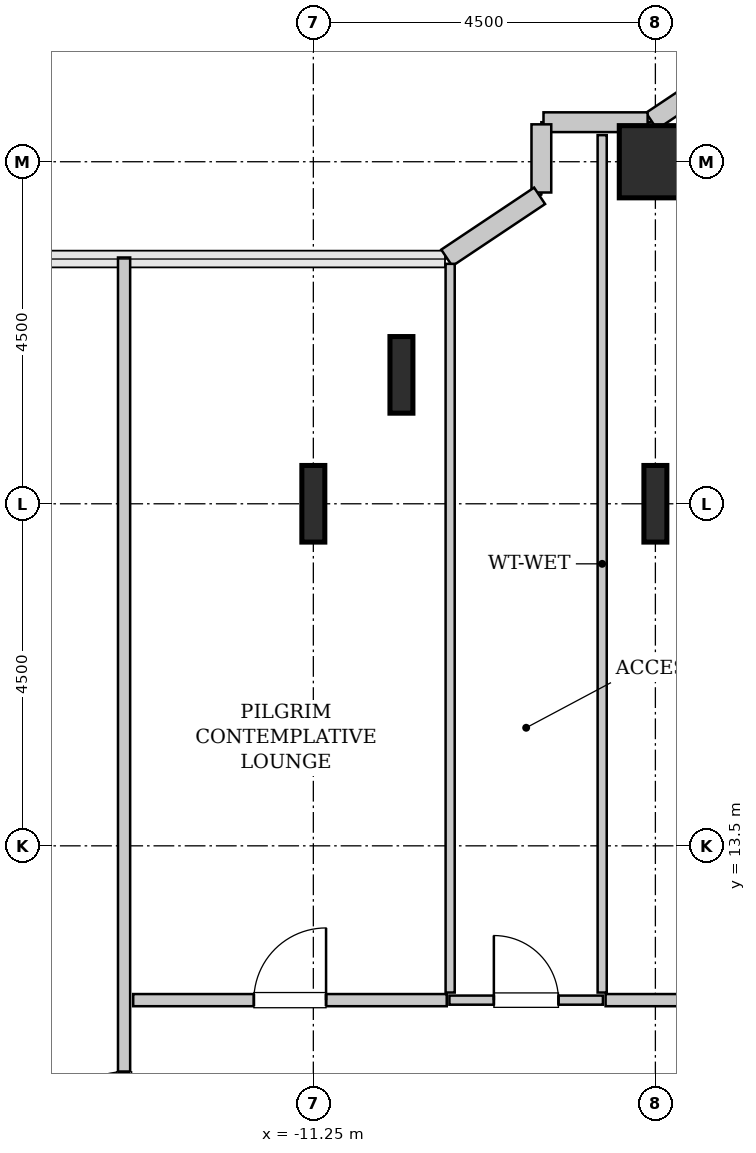
"""IFC4 building model, lengths in metres.
Left out: names, types, materials, properties, quantities, classifications, styles, units other than length and angle.
Written with IfcOpenShell. Run it as: python <this file> out.ifc"""

import sys

from ifc_helpers import new_model, si_unit, direction, frame, frame_2d, origin, origin_2d, place, context, subcontext, project, spatial, rectangle, hollow_rectangle, i_section, extrude, source, transform, mapped, element, fill, save


model = new_model("IFC4")
c1 = context("Model", 3, precision=1e-05, world=origin(), true_north=direction((0.0, 1.0)))
c2 = subcontext(c1, "Body", "Model", "MODEL_VIEW")
j1 = project(units=[si_unit("LENGTHUNIT", "METRE"), si_unit("PLANEANGLEUNIT", "RADIAN")], contexts=[c1])
p1 = place(None, origin())
s1 = spatial("IfcSite", under=j1, at=p1, CompositionType="ELEMENT")
p2 = place(p1, origin())
s2 = spatial("IfcBuilding", under=s1, at=p2, CompositionType="ELEMENT")
p3 = place(p2, frame((0.0, 0.0, 71.0)))
s3 = spatial("IfcBuildingStorey", under=s2, at=p3, CompositionType="ELEMENT", Elevation=71.0)
m1 = source(origin(), c2, "Body", "SweptSolid", [
    extrude(i_section(OverallWidth=0.302, OverallDepth=1.008, WebThickness=0.021, FlangeThickness=0.04, FilletRadius=0.03, at=origin_2d()), origin(), (0.0, 0.0, 1.0), 3.8),
])
for number, where, z_axis, x_axis in (
    (1, (-11.25, 18.0, 0.0), (0.0, 0.0, 1.0), (1.0, 0.0, 0.0)),
    (2, (-10.091, 19.696, 0.0), (0.0, 0.0, 1.0), (1.0, 0.0, 0.0)),
    (3, (-6.75, 18.0, 0.0), (0.0, 0.0, 1.0), (1.0, 0.0, 0.0)),
):
    element("IfcColumn", number, at=place(p3, frame(where, z_axis=z_axis, x_axis=x_axis)), inside=s3, PredefinedType="COLUMN", context=c2, shape_type="MappedRepresentation", body=[
        mapped(m1, transform((0.0, 0.0, 0.0), x_axis=(1.0, 0.0, 0.0), y_axis=(0.0, 1.0, 0.0), z_axis=(0.0, 0.0, 1.0), scale=1.0)),
    ])
m2 = source(origin(), c2, "Body", "SweptSolid", [
    extrude(hollow_rectangle(XDim=0.95, YDim=0.95, WallThickness=0.045, InnerFilletRadius=0.045, OuterFilletRadius=0.09, at=origin_2d()), origin(), (0.0, 0.0, 1.0), 3.8),
])
p4 = place(p3, frame((-6.75, 22.5, 0.0), z_axis=(0.0, 0.0, 1.0), x_axis=(1.0, 0.0, 0.0)))
e4 = element("IfcColumn", 4, at=p4, inside=s3, PredefinedType="COLUMN", context=c2, shape_type="MappedRepresentation", body=[
    mapped(m2, transform((0.0, 0.0, 0.0), x_axis=(1.0, 0.0, 0.0), y_axis=(0.0, 1.0, 0.0), z_axis=(0.0, 0.0, 1.0), scale=1.0)),
])
m3 = source(origin(), c2, "Body", "SweptSolid", [
    extrude(rectangle(XDim=0.565, YDim=0.26, at=frame_2d((0.283, 0.0))), origin(), (0.0, 0.0, 1.0), 3.55),
])
p5 = place(p3, frame((-6.331, 23.35, 0.0), z_axis=(0.0, 0.0, 1.0), x_axis=(-0.831651492666, -0.555297933317, 0.0)))
e5 = element("IfcWall", 5, at=p5, inside=s3, PredefinedType="SOLIDWALL", context=c2, shape_type="MappedRepresentation", body=[
    mapped(m3, transform((0.0, 0.0, 0.0), x_axis=(1.0, 0.0, 0.0), y_axis=(0.0, 1.0, 0.0), z_axis=(0.0, 0.0, 1.0), scale=1.0)),
])
m4 = source(origin(), c2, "Body", "SweptSolid", [
    extrude(rectangle(XDim=1.37, YDim=0.26, at=frame_2d((0.685, 0.0))), origin(), (0.0, 0.0, 1.0), 3.55),
])
p6 = place(p3, frame((-6.852, 23.02, 0.0), z_axis=(0.0, 0.0, 1.0), x_axis=(-1.0, 0.0, 0.0)))
e6 = element("IfcWall", 6, at=p6, inside=s3, PredefinedType="SOLIDWALL", context=c2, shape_type="MappedRepresentation", body=[
    mapped(m4, transform((0.0, 0.0, 0.0), x_axis=(1.0, 0.0, 0.0), y_axis=(0.0, 1.0, 0.0), z_axis=(0.0, 0.0, 1.0), scale=1.0)),
])
m5 = source(origin(), c2, "Body", "SweptSolid", [
    extrude(rectangle(XDim=0.897, YDim=0.26, at=frame_2d((0.448, 0.0))), origin(), (0.0, 0.0, 1.0), 3.55),
])
p7 = place(p3, frame((-8.25, 22.992, 0.0), z_axis=(0.0, 0.0, 1.0), x_axis=(0.0, -1.0, 0.0)))
e7 = element("IfcWall", 7, at=p7, inside=s3, PredefinedType="SOLIDWALL", context=c2, shape_type="MappedRepresentation", body=[
    mapped(m5, transform((0.0, 0.0, 0.0), x_axis=(1.0, 0.0, 0.0), y_axis=(0.0, 1.0, 0.0), z_axis=(0.0, 0.0, 1.0), scale=1.0)),
])
m6 = source(origin(), c2, "Body", "SweptSolid", [
    extrude(rectangle(XDim=1.469, YDim=0.26, at=frame_2d((0.734, 0.0))), origin(), (0.0, 0.0, 1.0), 3.55),
])
p8 = place(p3, frame((-8.273, 22.052, 0.0), z_axis=(0.0, 0.0, 1.0), x_axis=(-0.831461760506, -0.555581983884, 0.0)))
e8 = element("IfcWall", 8, at=p8, inside=s3, PredefinedType="SOLIDWALL", context=c2, shape_type="MappedRepresentation", body=[
    mapped(m6, transform((0.0, 0.0, 0.0), x_axis=(1.0, 0.0, 0.0), y_axis=(0.0, 1.0, 0.0), z_axis=(0.0, 0.0, 1.0), scale=1.0)),
])
m7 = source(origin(), c2, "Body", "SweptSolid", [
    extrude(rectangle(XDim=2.02, YDim=0.12, at=frame_2d((1.01, 0.0))), origin(), (0.0, 0.0, 1.0), 3.535),
])
p9 = place(p3, frame((-9.46, 11.47, 0.0), z_axis=(0.0, 0.0, 1.0), x_axis=(1.0, 0.0, 0.0)))
e9 = element("IfcWall", 9, at=p9, inside=s3, PredefinedType="PLUMBINGWALL", context=c2, shape_type="MappedRepresentation", body=[
    mapped(m7, transform((0.0, 0.0, 0.0), x_axis=(1.0, 0.0, 0.0), y_axis=(0.0, 1.0, 0.0), z_axis=(0.0, 0.0, 1.0), scale=1.0)),
])
p10 = place(p9, frame((0.585, 0.0, 0.0)))
e10 = element("IfcOpeningElement", 10, at=p10, cuts=e9, PredefinedType="OPENING", context=c2, shape_type="SweptSolid", body=[
    extrude(rectangle(XDim=0.85, YDim=2.1, at=frame_2d((0.425, 1.05))), frame((0.0, 0.07, 0.0), z_axis=(0.0, -1.0, 0.0), x_axis=(1.0, 0.0, 0.0)), (0.0, 0.0, 1.0), 0.14),
])
m8 = source(origin(), c2, "Body", "SweptSolid", [
    extrude(rectangle(XDim=11.28, YDim=0.12, at=frame_2d((5.64, 0.0))), origin(), (0.0, 0.0, 1.0), 3.535),
])
p11 = place(p3, frame((-7.45, 11.57, 0.0), z_axis=(0.0, 0.0, 1.0), x_axis=(0.0, 1.0, 0.0)))
e11 = element("IfcWall", 11, at=p11, inside=s3, PredefinedType="PLUMBINGWALL", context=c2, shape_type="MappedRepresentation", body=[
    mapped(m8, transform((0.0, 0.0, 0.0), x_axis=(1.0, 0.0, 0.0), y_axis=(0.0, 1.0, 0.0), z_axis=(0.0, 0.0, 1.0), scale=1.0)),
])
m9 = source(origin(), c2, "Body", "SweptSolid", [
    extrude(rectangle(XDim=9.587, YDim=0.12, at=frame_2d((4.793, 0.0))), origin(), (0.0, 0.0, 1.0), 3.535),
])
p12 = place(p3, frame((-9.45, 11.57, 0.0), z_axis=(0.0, 0.0, 1.0), x_axis=(0.0, 1.0, 0.0)))
e12 = element("IfcWall", 12, at=p12, inside=s3, PredefinedType="PLUMBINGWALL", context=c2, shape_type="MappedRepresentation", body=[
    mapped(m9, transform((0.0, 0.0, 0.0), x_axis=(1.0, 0.0, 0.0), y_axis=(0.0, 1.0, 0.0), z_axis=(0.0, 0.0, 1.0), scale=1.0)),
])
m10 = source(origin(), c2, "Body", "SweptSolid", [
    extrude(rectangle(XDim=12.645, YDim=0.16, at=frame_2d((6.323, 0.0))), origin(), (0.0, 0.0, 1.0), 3.535),
])
p13 = place(p3, frame((-13.74, 8.595, 0.0), z_axis=(0.0, 0.0, 1.0), x_axis=(0.0, 1.0, 0.0)))
e13 = element("IfcWall", 13, at=p13, inside=s3, PredefinedType="PARTITIONING", context=c2, shape_type="MappedRepresentation", body=[
    mapped(m10, transform((0.0, 0.0, 0.0), x_axis=(1.0, 0.0, 0.0), y_axis=(0.0, 1.0, 0.0), z_axis=(0.0, 0.0, 1.0), scale=1.0)),
])
p14 = place(p13, frame((0.982, 0.0, 0.0)))
e14 = element("IfcOpeningElement", 14, at=p14, cuts=e13, PredefinedType="OPENING", context=c2, shape_type="SweptSolid", body=[
    extrude(rectangle(XDim=0.95, YDim=2.1, at=frame_2d((0.475, 1.05))), frame((0.0, 0.09, 0.0), z_axis=(0.0, -1.0, 0.0), x_axis=(1.0, 0.0, 0.0)), (0.0, 0.0, 1.0), 0.18),
])
m11 = source(origin(), c2, "Body", "SweptSolid", [
    extrude(rectangle(XDim=4.125, YDim=0.16, at=frame_2d((2.062, 0.0))), origin(), (0.0, 0.0, 1.0), 3.535),
])
p15 = place(p3, frame((-13.62, 11.47, 0.0), z_axis=(0.0, 0.0, 1.0), x_axis=(1.0, 0.0, 0.0)))
e15 = element("IfcWall", 15, at=p15, inside=s3, PredefinedType="PARTITIONING", context=c2, shape_type="MappedRepresentation", body=[
    mapped(m11, transform((0.0, 0.0, 0.0), x_axis=(1.0, 0.0, 0.0), y_axis=(0.0, 1.0, 0.0), z_axis=(0.0, 0.0, 1.0), scale=1.0)),
])
p16 = place(p15, frame((1.587, 0.0, 0.0)))
e16 = element("IfcOpeningElement", 16, at=p16, cuts=e15, PredefinedType="OPENING", context=c2, shape_type="SweptSolid", body=[
    extrude(rectangle(XDim=0.95, YDim=2.1, at=frame_2d((0.475, 1.05))), frame((0.0, 0.09, 0.0), z_axis=(0.0, -1.0, 0.0), x_axis=(1.0, 0.0, 0.0)), (0.0, 0.0, 1.0), 0.18),
])
m12 = source(origin(), c2, "Body", "SweptSolid", [
    extrude(rectangle(XDim=4.605, YDim=0.16, at=frame_2d((2.302, 0.0))), origin(), (0.0, 0.0, 1.0), 3.535),
])
p17 = place(p3, frame((-7.405, 11.47, 0.0), z_axis=(0.0, 0.0, 1.0), x_axis=(1.0, 0.0, 0.0)))
e17 = element("IfcWall", 17, at=p17, inside=s3, PredefinedType="PARTITIONING", context=c2, shape_type="MappedRepresentation", body=[
    mapped(m12, transform((0.0, 0.0, 0.0), x_axis=(1.0, 0.0, 0.0), y_axis=(0.0, 1.0, 0.0), z_axis=(0.0, 0.0, 1.0), scale=1.0)),
])
p18 = place(p17, frame((1.827, 0.0, 0.0)))
e18 = element("IfcOpeningElement", 18, at=p18, cuts=e17, PredefinedType="OPENING", context=c2, shape_type="SweptSolid", body=[
    extrude(rectangle(XDim=0.95, YDim=2.1, at=frame_2d((0.475, 1.05))), frame((0.0, 0.09, 0.0), z_axis=(0.0, -1.0, 0.0), x_axis=(1.0, 0.0, 0.0)), (0.0, 0.0, 1.0), 0.18),
])
m13 = source(origin(), c2, "Body", "SweptSolid", [
    extrude(rectangle(XDim=0.85, YDim=2.1, at=frame_2d((0.425, 1.05))), frame((0.0, 0.025, 0.0), z_axis=(0.0, -1.0, 0.0), x_axis=(1.0, 0.0, 0.0)), (0.0, 0.0, 1.0), 0.05),
])
p19 = place(p10, origin())
e19 = element("IfcDoor", 19, at=p19, inside=s3, OperationType="SINGLE_SWING_LEFT", PredefinedType="DOOR", context=c2, shape_type="MappedRepresentation", body=[
    mapped(m13, transform((0.0, 0.0, 0.0), x_axis=(1.0, 0.0, 0.0), y_axis=(0.0, 1.0, 0.0), z_axis=(0.0, 0.0, 1.0), scale=1.0)),
])
fill(e10, e19)
m14 = source(origin(), c2, "Body", "SweptSolid", [
    extrude(rectangle(XDim=0.95, YDim=2.1, at=frame_2d((0.475, 1.05))), frame((0.0, 0.025, 0.0), z_axis=(0.0, -1.0, 0.0), x_axis=(1.0, 0.0, 0.0)), (0.0, 0.0, 1.0), 0.05),
])
p20 = place(p14, origin())
e20 = element("IfcDoor", 20, at=p20, inside=s3, OperationType="SINGLE_SWING_LEFT", PredefinedType="DOOR", context=c2, shape_type="MappedRepresentation", body=[
    mapped(m14, transform((0.0, 0.0, 0.0), x_axis=(1.0, 0.0, 0.0), y_axis=(0.0, 1.0, 0.0), z_axis=(0.0, 0.0, 1.0), scale=1.0)),
])
fill(e14, e20)
p21 = place(p16, origin())
e21 = element("IfcDoor", 21, at=p21, inside=s3, OperationType="SINGLE_SWING_RIGHT", PredefinedType="DOOR", context=c2, shape_type="MappedRepresentation", body=[
    mapped(m14, transform((0.0, 0.0, 0.0), x_axis=(1.0, 0.0, 0.0), y_axis=(0.0, 1.0, 0.0), z_axis=(0.0, 0.0, 1.0), scale=1.0)),
])
fill(e16, e21)
save(model, sys.argv[1])
